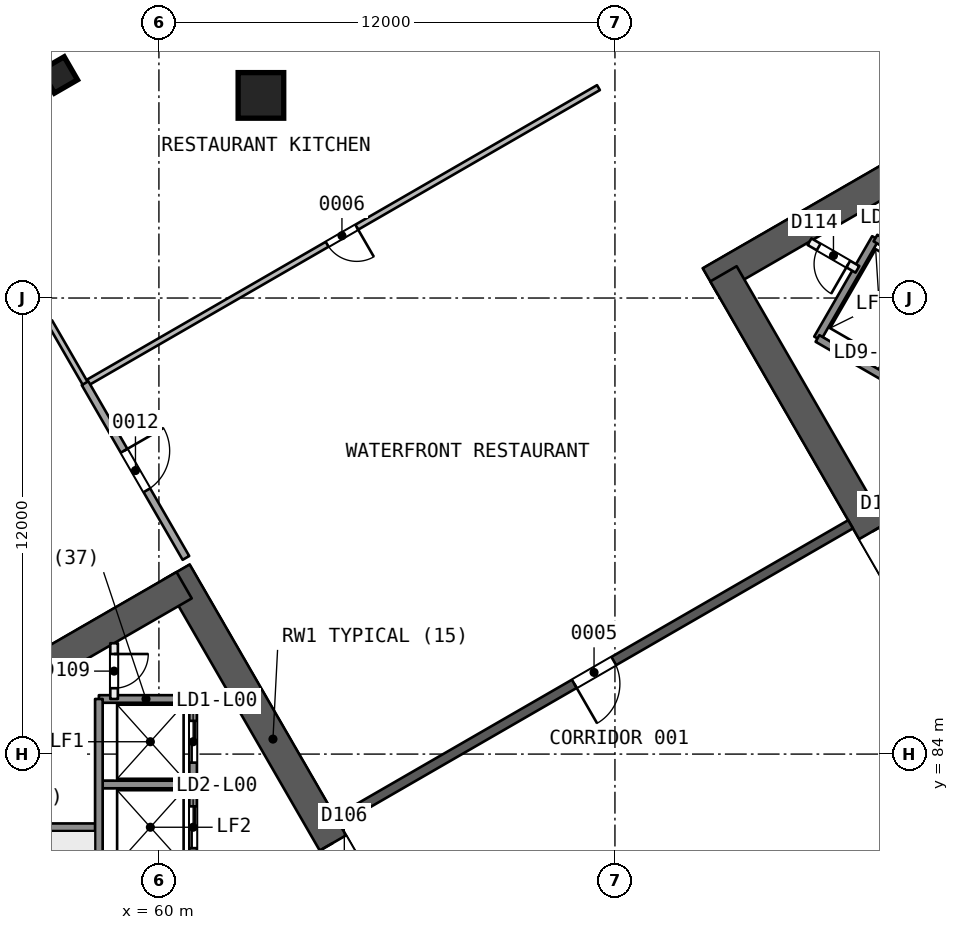
"""IFC4 building model, lengths in metres.
Left out: names, types, materials, properties, quantities, classifications, styles, units other than length and angle.
Written with IfcOpenShell. Run it as: python <this file> out.ifc"""

import sys

from ifc_helpers import new_model, si_unit, direction, frame, frame_2d, origin, origin_2d, place, context, subcontext, project, spatial, rectangle, extrude, element, fill, save


model = new_model("IFC4")
c1 = context("Model", 3, precision=1e-05, world=origin(), true_north=direction((0.0, 1.0)))
c2 = subcontext(c1, "Body", "Model", "MODEL_VIEW")
j1 = project(units=[si_unit("LENGTHUNIT", "METRE"), si_unit("PLANEANGLEUNIT", "RADIAN")], contexts=[c1])
p1 = place(None, origin())
s1 = spatial("IfcSite", under=j1, at=p1, CompositionType="ELEMENT")
p2 = place(p1, origin())
s2 = spatial("IfcBuilding", under=s1, at=p2, CompositionType="ELEMENT")
p3 = place(p2, origin())
s3 = spatial("IfcBuildingStorey", under=s2, at=p3, CompositionType="ELEMENT", Elevation=0.0)
p4 = place(p3, frame((65.538, 80.0, 0.0), z_axis=(0.0, 0.0, 1.0), x_axis=(-0.49999662545, 0.866027352073, 0.0)))
e1 = element("IfcWall", 1, at=p4, inside=s3, PredefinedType="SHEAR", context=c2, shape_type="SweptSolid", body=[
    extrude(rectangle(XDim=10.149, YDim=0.8, at=frame_2d((5.074, 0.0))), origin(), (0.0, 0.0, 1.0), 9.0),
])
p5 = place(p4, frame((0.719, 0.0, 0.0)))
e2 = element("IfcOpeningElement", 2, at=p5, cuts=e1, PredefinedType="OPENING", context=c2, shape_type="SweptSolid", body=[
    extrude(rectangle(XDim=1.2, YDim=2.1, at=frame_2d((0.6, 1.05))), frame((0.0, 0.411, 0.0), z_axis=(0.0, -1.0, 0.0), x_axis=(1.0, 0.0, 0.0)), (0.0, 0.0, 1.0), 0.821),
])
p6 = place(p3, frame((60.664, 88.443, 0.0), z_axis=(0.0, 0.0, 1.0), x_axis=(-0.866029478545, -0.499992942241, 0.0)))
e3 = element("IfcWall", 3, at=p6, inside=s3, PredefinedType="SHEAR", context=c2, shape_type="SweptSolid", body=[
    extrude(rectangle(XDim=13.933, YDim=0.8, at=frame_2d((6.967, 0.0))), origin(), (0.0, 0.0, 1.0), 9.0),
])
p7 = place(p3, frame((86.723, 103.488, 0.0), z_axis=(0.0, 0.0, 1.0), x_axis=(-0.866032504327, -0.499987701298, 0.0)))
e4 = element("IfcWall", 4, at=p7, inside=s3, PredefinedType="SHEAR", context=c2, shape_type="SweptSolid", body=[
    extrude(rectangle(XDim=14.102, YDim=0.8, at=frame_2d((7.051, 0.0))), origin(), (0.0, 0.0, 1.0), 9.0),
])
p8 = place(p7, frame((5.139, 0.0, 0.0)))
e5 = element("IfcOpeningElement", 5, at=p8, cuts=e4, PredefinedType="OPENING", context=c2, shape_type="SweptSolid", body=[
    extrude(rectangle(XDim=2.2, YDim=2.1, at=frame_2d((1.1, 1.05))), frame((0.0, 0.411, 0.0), z_axis=(0.0, -1.0, 0.0), x_axis=(1.0, 0.0, 0.0)), (0.0, 0.0, 1.0), 0.821),
])
p9 = place(p3, frame((74.856, 96.637, 0.0), z_axis=(0.0, 0.0, 1.0), x_axis=(0.499993500917, -0.866029155999, 0.0)))
e6 = element("IfcWall", 6, at=p9, inside=s3, PredefinedType="SHEAR", context=c2, shape_type="SweptSolid", body=[
    extrude(rectangle(XDim=9.98, YDim=0.8, at=frame_2d((4.99, 0.0))), origin(), (0.0, 0.0, 1.0), 9.0),
])
p10 = place(p9, frame((7.83, 0.0, 0.0)))
e7 = element("IfcOpeningElement", 7, at=p10, cuts=e6, PredefinedType="OPENING", context=c2, shape_type="SweptSolid", body=[
    extrude(rectangle(XDim=1.2, YDim=2.1, at=frame_2d((0.6, 1.05))), frame((0.0, 0.411, 0.0), z_axis=(0.0, -1.0, 0.0), x_axis=(1.0, 0.0, 0.0)), (0.0, 0.0, 1.0), 0.821),
])
p11 = place(p3, frame((78.2, 90.046, 0.0), z_axis=(0.0, 0.0, 1.0), x_axis=(-0.866026492143, -0.499998114903, 0.0)))
e8 = element("IfcWall", 8, at=p11, inside=s3, PredefinedType="SHEAR", context=c2, shape_type="SweptSolid", body=[
    extrude(rectangle(XDim=15.588, YDim=0.25, at=frame_2d((7.794, 0.0))), origin(), (0.0, 0.0, 1.0), 8.6),
])
p12 = place(p11, frame((7.194, 0.0, 0.0)))
e9 = element("IfcOpeningElement", 9, at=p12, cuts=e8, PredefinedType="OPENING", context=c2, shape_type="SweptSolid", body=[
    extrude(rectangle(XDim=1.2, YDim=2.4, at=frame_2d((0.6, 1.2))), frame((0.0, 0.135, 0.0), z_axis=(0.0, -1.0, 0.0), x_axis=(1.0, 0.0, 0.0)), (0.0, 0.0, 1.0), 0.271),
])
p13 = place(p3, frame((62.672, 101.353, 0.0), z_axis=(0.010089088034, -0.017493176833, 0.999796078742), x_axis=(0.866252402262, 0.499606620828, 1.0221e-08)))
e10 = element("IfcColumn", 10, at=p13, inside=s3, PredefinedType="COLUMN", context=c2, shape_type="SweptSolid", body=[
    extrude(rectangle(XDim=1.2, YDim=1.2, at=origin_2d()), origin(), (0.0, 0.0, 1.0), 9.002),
])
p14 = place(p3, frame((57.379, 101.869, -0.4), z_axis=(0.0, 0.0, 1.0), x_axis=(0.866025403784, 0.5, 0.0)))
e11 = element("IfcColumn", 11, at=p14, inside=s3, PredefinedType="COLUMN", context=c2, shape_type="SweptSolid", body=[
    extrude(rectangle(XDim=0.7, YDim=0.7, at=origin_2d()), origin(), (0.0, 0.0, 1.0), 9.4),
])
p15 = place(p3, frame((71.566, 101.536, 0.0), z_axis=(0.0, 0.0, 1.0), x_axis=(-0.866026492143, -0.499998114903, 0.0)))
e12 = element("IfcWall", 12, at=p15, inside=s3, PredefinedType="PARTITIONING", context=c2, shape_type="SweptSolid", body=[
    extrude(rectangle(XDim=15.588, YDim=0.15, at=frame_2d((7.794, 0.0))), origin(), (0.0, 0.0, 1.0), 8.6),
])
p16 = place(p15, frame((7.344, 0.0, 0.0)))
e13 = element("IfcOpeningElement", 13, at=p16, cuts=e12, PredefinedType="OPENING", context=c2, shape_type="SweptSolid", body=[
    extrude(rectangle(XDim=0.9, YDim=2.1, at=frame_2d((0.45, 1.05))), frame((0.0, 0.085, 0.0), z_axis=(0.0, -1.0, 0.0), x_axis=(1.0, 0.0, 0.0)), (0.0, 0.0, 1.0), 0.171),
])
p17 = place(p3, frame((58.056, 93.76, 0.0), z_axis=(0.0, 0.0, 1.0), x_axis=(0.499991804824, -0.86603013522, 0.0)))
e14 = element("IfcWall", 14, at=p17, inside=s3, PredefinedType="PARTITIONING", context=c2, shape_type="SweptSolid", body=[
    extrude(rectangle(XDim=5.309, YDim=0.2, at=frame_2d((2.655, 0.0))), origin(), (0.0, 0.0, 1.0), 8.6),
])
p18 = place(p17, frame((2.054, 0.0, 0.0)))
e15 = element("IfcOpeningElement", 15, at=p18, cuts=e14, PredefinedType="OPENING", context=c2, shape_type="SweptSolid", body=[
    extrude(rectangle(XDim=1.2, YDim=2.4, at=frame_2d((0.6, 1.2))), frame((0.0, 0.11, 0.0), z_axis=(0.0, -1.0, 0.0), x_axis=(1.0, 0.0, 0.0)), (0.0, 0.0, 1.0), 0.221),
])
p19 = place(p3, frame((57.122, 95.377, 0.0), z_axis=(0.0, 0.0, 1.0), x_axis=(0.500006788699, -0.866021484292, 0.0)))
e16 = element("IfcWall", 16, at=p19, inside=s3, PredefinedType="PARTITIONING", context=c2, shape_type="SweptSolid", body=[
    extrude(rectangle(XDim=1.908, YDim=0.15, at=frame_2d((0.954, 0.0))), origin(), (0.0, 0.0, 1.0), 8.6),
])
for number, where, z_axis, x_axis in (
    (17, (60.9, 85.45, 0.0), (0.0, 0.0, 1.0), (-1.0, 0.0, 0.0)),
    (18, (60.9, 83.2, 0.0), (0.0, 0.0, 1.0), (-1.0, 0.0, 0.0)),
):
    element("IfcWall", number, at=place(p3, frame(where, z_axis=z_axis, x_axis=x_axis)), inside=s3, PredefinedType="SOLIDWALL", context=c2, shape_type="SweptSolid", body=[
        extrude(rectangle(XDim=2.48, YDim=0.2, at=frame_2d((1.24, 0.0))), origin(), (0.0, 0.0, 1.0), 8.6),
    ])
p20 = place(p3, frame((58.42, 82.075, 0.0), z_axis=(0.0, 0.0, 1.0), x_axis=(-1.0, 0.0, 0.0)))
e19 = element("IfcWall", 19, at=p20, inside=s3, PredefinedType="SOLIDWALL", context=c2, shape_type="SweptSolid", body=[
    extrude(rectangle(XDim=7.7, YDim=0.2, at=frame_2d((3.85, 0.0))), origin(), (0.0, 0.0, 1.0), 8.6),
])
p21 = place(p3, frame((60.9, 85.45, 0.0), z_axis=(0.0, 0.0, 1.0), x_axis=(0.0, -1.0, 0.0)))
e20 = element("IfcWall", 20, at=p21, inside=s3, PredefinedType="SOLIDWALL", context=c2, shape_type="SweptSolid", body=[
    extrude(rectangle(XDim=10.9, YDim=0.2, at=frame_2d((5.45, 0.0))), origin(), (0.0, 0.0, 1.0), 8.6),
])
p22 = place(p21, frame((0.575, 0.0, 0.0)))
e21 = element("IfcOpeningElement", 21, at=p22, cuts=e20, PredefinedType="OPENING", context=c2, shape_type="SweptSolid", body=[
    extrude(rectangle(XDim=1.1, YDim=2.1, at=frame_2d((0.55, 1.05))), frame((0.0, 0.11, 0.0), z_axis=(0.0, -1.0, 0.0), x_axis=(1.0, 0.0, 0.0)), (0.0, 0.0, 1.0), 0.221),
])
p23 = place(p21, frame((2.825, 0.0, 0.0)))
e22 = element("IfcOpeningElement", 22, at=p23, cuts=e20, PredefinedType="OPENING", context=c2, shape_type="SweptSolid", body=[
    extrude(rectangle(XDim=1.1, YDim=2.1, at=frame_2d((0.55, 1.05))), frame((0.0, 0.11, 0.0), z_axis=(0.0, -1.0, 0.0), x_axis=(1.0, 0.0, 0.0)), (0.0, 0.0, 1.0), 0.221),
])
p24 = place(p21, frame((5.075, 0.0, 0.0)))
e23 = element("IfcOpeningElement", 23, at=p24, cuts=e20, PredefinedType="OPENING", context=c2, shape_type="SweptSolid", body=[
    extrude(rectangle(XDim=1.1, YDim=2.1, at=frame_2d((0.55, 1.05))), frame((0.0, 0.11, 0.0), z_axis=(0.0, -1.0, 0.0), x_axis=(1.0, 0.0, 0.0)), (0.0, 0.0, 1.0), 0.221),
])
p25 = place(p21, frame((7.325, 0.0, 0.0)))
e24 = element("IfcOpeningElement", 24, at=p25, cuts=e20, PredefinedType="OPENING", context=c2, shape_type="SweptSolid", body=[
    extrude(rectangle(XDim=1.1, YDim=2.1, at=frame_2d((0.55, 1.05))), frame((0.0, 0.11, 0.0), z_axis=(0.0, -1.0, 0.0), x_axis=(1.0, 0.0, 0.0)), (0.0, 0.0, 1.0), 0.221),
])
p26 = place(p3, frame((58.82, 86.917, 0.0), z_axis=(0.0, 0.0, 1.0), x_axis=(0.0, -1.0, 0.0)))
e25 = element("IfcWall", 25, at=p26, inside=s3, PredefinedType="PARTITIONING", context=c2, shape_type="SweptSolid", body=[
    extrude(rectangle(XDim=1.467, YDim=0.2, at=frame_2d((0.733, 0.0))), origin(), (0.0, 0.0, 1.0), 8.6),
])
p27 = place(p26, frame((0.283, 0.0, 0.0)))
e26 = element("IfcOpeningElement", 26, at=p27, cuts=e25, PredefinedType="OPENING", context=c2, shape_type="SweptSolid", body=[
    extrude(rectangle(XDim=0.9, YDim=2.1, at=frame_2d((0.45, 1.05))), frame((0.0, 0.11, 0.0), z_axis=(0.0, -1.0, 0.0), x_axis=(1.0, 0.0, 0.0)), (0.0, 0.0, 1.0), 0.221),
])
p28 = place(p3, frame((58.42, 85.45, 0.0), z_axis=(0.0, 0.0, 1.0), x_axis=(0.0, -1.0, 0.0)))
e27 = element("IfcWall", 27, at=p28, inside=s3, PredefinedType="SOLIDWALL", context=c2, shape_type="SweptSolid", body=[
    extrude(rectangle(XDim=9.0, YDim=0.2, at=frame_2d((4.5, 0.0))), origin(), (0.0, 0.0, 1.0), 8.6),
])
for number, where, z_axis, x_axis in (
    (28, (78.976, 93.986, 0.0), (0.0, 0.0, 1.0), (0.5, 0.866, 0.0)),
    (29, (77.33, 94.936, 0.0), (0.0, 0.0, 1.0), (0.5, 0.866, 0.0)),
):
    element("IfcWall", number, at=place(p3, frame(where, z_axis=z_axis, x_axis=x_axis)), inside=s3, PredefinedType="SOLIDWALL", context=c2, shape_type="SweptSolid", body=[
        extrude(rectangle(XDim=3.05, YDim=0.2, at=frame_2d((1.525, 0.0))), origin(), (0.0, 0.0, 1.0), 8.6),
    ])
p29 = place(p3, frame((86.77, 89.486, 0.0), z_axis=(0.0, 0.0, 1.0), x_axis=(-0.86601811187, 0.500012629753, 0.0)))
e30 = element("IfcWall", 30, at=p29, inside=s3, PredefinedType="SOLIDWALL", context=c2, shape_type="SweptSolid", body=[
    extrude(rectangle(XDim=10.9, YDim=0.2, at=frame_2d((5.45, 0.0))), origin(), (0.0, 0.0, 1.0), 8.6),
])
p30 = place(p29, frame((0.575, 0.0, 0.0)))
e31 = element("IfcOpeningElement", 31, at=p30, cuts=e30, PredefinedType="OPENING", context=c2, shape_type="SweptSolid", body=[
    extrude(rectangle(XDim=1.1, YDim=2.1, at=frame_2d((0.55, 1.05))), frame((0.0, 0.11, 0.0), z_axis=(0.0, -1.0, 0.0), x_axis=(1.0, 0.0, 0.0)), (0.0, 0.0, 1.0), 0.221),
])
p31 = place(p29, frame((2.825, 0.0, 0.0)))
e32 = element("IfcOpeningElement", 32, at=p31, cuts=e30, PredefinedType="OPENING", context=c2, shape_type="SweptSolid", body=[
    extrude(rectangle(XDim=1.1, YDim=2.1, at=frame_2d((0.55, 1.05))), frame((0.0, 0.11, 0.0), z_axis=(0.0, -1.0, 0.0), x_axis=(1.0, 0.0, 0.0)), (0.0, 0.0, 1.0), 0.221),
])
p32 = place(p29, frame((5.075, 0.0, 0.0)))
e33 = element("IfcOpeningElement", 33, at=p32, cuts=e30, PredefinedType="OPENING", context=c2, shape_type="SweptSolid", body=[
    extrude(rectangle(XDim=1.1, YDim=2.1, at=frame_2d((0.55, 1.05))), frame((0.0, 0.11, 0.0), z_axis=(0.0, -1.0, 0.0), x_axis=(1.0, 0.0, 0.0)), (0.0, 0.0, 1.0), 0.221),
])
p33 = place(p29, frame((7.325, 0.0, 0.0)))
e34 = element("IfcOpeningElement", 34, at=p33, cuts=e30, PredefinedType="OPENING", context=c2, shape_type="SweptSolid", body=[
    extrude(rectangle(XDim=1.1, YDim=2.1, at=frame_2d((0.55, 1.05))), frame((0.0, 0.11, 0.0), z_axis=(0.0, -1.0, 0.0), x_axis=(1.0, 0.0, 0.0)), (0.0, 0.0, 1.0), 0.221),
])
p34 = place(p3, frame((78.38, 96.755, 0.0), z_axis=(0.0, 0.0, 1.0), x_axis=(-0.866003949776, 0.500037157592, 0.0)))
e35 = element("IfcWall", 35, at=p34, inside=s3, PredefinedType="PARTITIONING", context=c2, shape_type="SweptSolid", body=[
    extrude(rectangle(XDim=1.455, YDim=0.2, at=frame_2d((0.728, 0.0))), origin(), (0.0, 0.0, 1.0), 8.6),
])
p35 = place(p34, frame((0.278, 0.0, 0.0)))
e36 = element("IfcOpeningElement", 36, at=p35, cuts=e35, PredefinedType="OPENING", context=c2, shape_type="SweptSolid", body=[
    extrude(rectangle(XDim=0.9, YDim=2.1, at=frame_2d((0.45, 1.05))), frame((0.0, 0.11, 0.0), z_axis=(0.0, -1.0, 0.0), x_axis=(1.0, 0.0, 0.0)), (0.0, 0.0, 1.0), 0.221),
])
p36 = place(p3, frame((80.5, 96.627, 0.0), z_axis=(0.0, 0.0, 1.0), x_axis=(-0.86601224135, 0.500022797313, 0.0)))
e37 = element("IfcWall", 37, at=p36, inside=s3, PredefinedType="SOLIDWALL", context=c2, shape_type="SweptSolid", body=[
    extrude(rectangle(XDim=1.9, YDim=0.2, at=frame_2d((0.95, 0.0))), origin(), (0.0, 0.0, 1.0), 8.6),
])
p37 = place(p36, frame((0.4, 0.0, 0.0)))
e38 = element("IfcOpeningElement", 38, at=p37, cuts=e37, PredefinedType="OPENING", context=c2, shape_type="SweptSolid", body=[
    extrude(rectangle(XDim=1.1, YDim=2.1, at=frame_2d((0.55, 1.05))), frame((0.0, 0.11, 0.0), z_axis=(0.0, -1.0, 0.0), x_axis=(1.0, 0.0, 0.0)), (0.0, 0.0, 1.0), 0.221),
])
p38 = place(p12, origin())
e39 = element("IfcDoor", 39, at=p38, inside=s3, OperationType="SINGLE_SWING_RIGHT", PredefinedType="NOTDEFINED", context=c2, shape_type="SweptSolid", body=[
    extrude(rectangle(XDim=1.2, YDim=2.4, at=frame_2d((0.6, 1.2))), frame((0.0, 0.025, 0.0), z_axis=(0.0, -1.0, 0.0), x_axis=(1.0, 0.0, 0.0)), (0.0, 0.0, 1.0), 0.05),
])
fill(e9, e39)
p39 = place(p16, origin())
e40 = element("IfcDoor", 40, at=p39, inside=s3, OperationType="SINGLE_SWING_LEFT", PredefinedType="NOTDEFINED", context=c2, shape_type="SweptSolid", body=[
    extrude(rectangle(XDim=0.9, YDim=2.1, at=frame_2d((0.45, 1.05))), frame((0.0, 0.025, 0.0), z_axis=(0.0, -1.0, 0.0), x_axis=(1.0, 0.0, 0.0)), (0.0, 0.0, 1.0), 0.05),
])
fill(e13, e40)
p40 = place(p18, origin())
e41 = element("IfcDoor", 41, at=p40, inside=s3, OperationType="SINGLE_SWING_LEFT", PredefinedType="NOTDEFINED", context=c2, shape_type="SweptSolid", body=[
    extrude(rectangle(XDim=1.2, YDim=2.4, at=frame_2d((0.6, 1.2))), frame((0.0, 0.025, 0.0), z_axis=(0.0, -1.0, 0.0), x_axis=(1.0, 0.0, 0.0)), (0.0, 0.0, 1.0), 0.05),
])
fill(e15, e41)
p41 = place(p5, origin())
e42 = element("IfcDoor", 42, at=p41, inside=s3, OperationType="SINGLE_SWING_RIGHT", PredefinedType="NOTDEFINED", context=c2, shape_type="SweptSolid", body=[
    extrude(rectangle(XDim=1.2, YDim=2.1, at=frame_2d((0.6, 1.05))), frame((0.0, 0.025, 0.0), z_axis=(0.0, -1.0, 0.0), x_axis=(1.0, 0.0, 0.0)), (0.0, 0.0, 1.0), 0.05),
])
fill(e2, e42)
p42 = place(p22, origin())
e43 = element("IfcDoor", 43, at=p42, inside=s3, OperationType="SLIDING_TO_RIGHT", PredefinedType="NOTDEFINED", context=c2, shape_type="SweptSolid", body=[
    extrude(rectangle(XDim=1.1, YDim=2.1, at=frame_2d((0.55, 1.05))), frame((0.0, 0.025, 0.0), z_axis=(0.0, -1.0, 0.0), x_axis=(1.0, 0.0, 0.0)), (0.0, 0.0, 1.0), 0.05),
])
fill(e21, e43)
p43 = place(p23, origin())
e44 = element("IfcDoor", 44, at=p43, inside=s3, OperationType="SLIDING_TO_LEFT", PredefinedType="NOTDEFINED", context=c2, shape_type="SweptSolid", body=[
    extrude(rectangle(XDim=1.1, YDim=2.1, at=frame_2d((0.55, 1.05))), frame((0.0, 0.025, 0.0), z_axis=(0.0, -1.0, 0.0), x_axis=(1.0, 0.0, 0.0)), (0.0, 0.0, 1.0), 0.05),
])
fill(e22, e44)
p44 = place(p27, origin())
e45 = element("IfcDoor", 45, at=p44, inside=s3, OperationType="SINGLE_SWING_LEFT", PredefinedType="NOTDEFINED", context=c2, shape_type="SweptSolid", body=[
    extrude(rectangle(XDim=0.9, YDim=2.1, at=frame_2d((0.45, 1.05))), frame((0.0, 0.025, 0.0), z_axis=(0.0, -1.0, 0.0), x_axis=(1.0, 0.0, 0.0)), (0.0, 0.0, 1.0), 0.05),
])
fill(e26, e45)
p45 = place(p10, origin())
e46 = element("IfcDoor", 46, at=p45, inside=s3, OperationType="SINGLE_SWING_LEFT", PredefinedType="NOTDEFINED", context=c2, shape_type="SweptSolid", body=[
    extrude(rectangle(XDim=1.2, YDim=2.1, at=frame_2d((0.6, 1.05))), frame((0.0, 0.025, 0.0), z_axis=(0.0, -1.0, 0.0), x_axis=(1.0, 0.0, 0.0)), (0.0, 0.0, 1.0), 0.05),
])
fill(e7, e46)
p46 = place(p35, origin())
e47 = element("IfcDoor", 47, at=p46, inside=s3, OperationType="SINGLE_SWING_LEFT", PredefinedType="NOTDEFINED", context=c2, shape_type="SweptSolid", body=[
    extrude(rectangle(XDim=0.9, YDim=2.1, at=frame_2d((0.45, 1.05))), frame((0.0, 0.025, 0.0), z_axis=(0.0, -1.0, 0.0), x_axis=(1.0, 0.0, 0.0)), (0.0, 0.0, 1.0), 0.05),
])
fill(e36, e47)
save(model, sys.argv[1])
